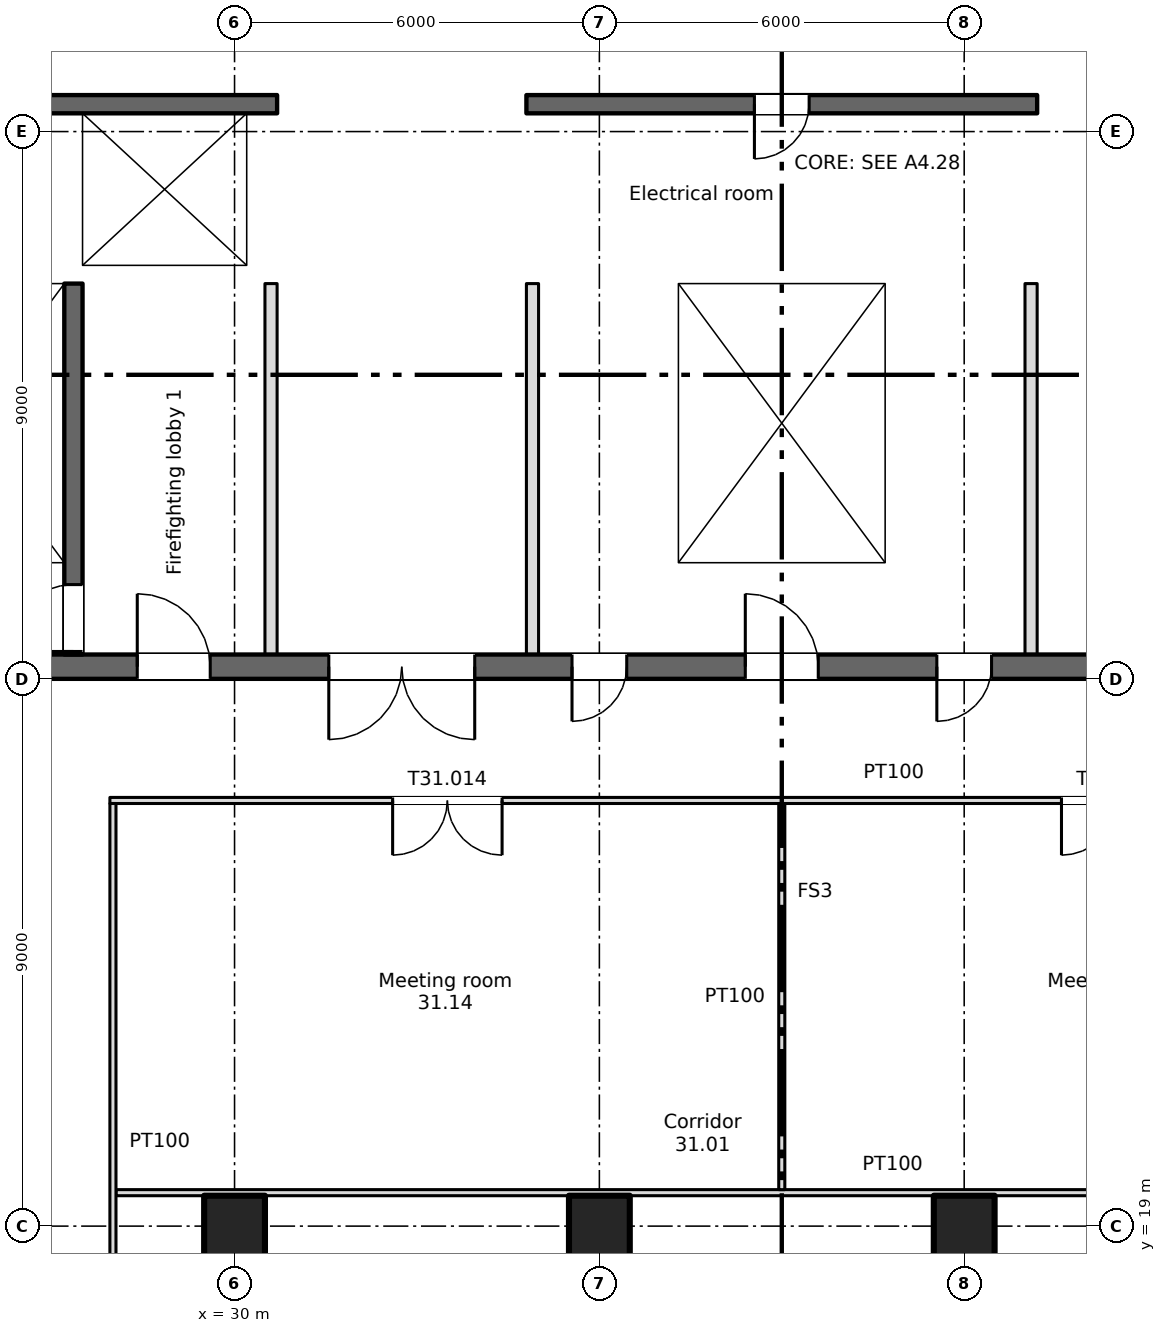
"""IFC4 building model, lengths in metres.
Left out: names, types, materials, properties, quantities, classifications, styles, units other than length and angle.
Written with IfcOpenShell. Run it as: python <this file> out.ifc"""

import sys

from ifc_helpers import new_model, si_unit, direction, frame, frame_2d, origin, origin_2d, place, context, subcontext, project, spatial, rectangle, extrude, element, fill, save


model = new_model("IFC4")
c1 = context("Model", 3, precision=1e-05, world=origin(), true_north=direction((0.0, 1.0)))
c2 = subcontext(c1, "Body", "Model", "MODEL_VIEW")
j1 = project(units=[si_unit("LENGTHUNIT", "METRE"), si_unit("PLANEANGLEUNIT", "RADIAN")], contexts=[c1])
p1 = place(None, origin())
s1 = spatial("IfcSite", under=j1, at=p1, CompositionType="ELEMENT")
p2 = place(p1, origin())
s2 = spatial("IfcBuilding", under=s1, at=p2, CompositionType="ELEMENT")
p3 = place(p2, frame((0.0, 0.0, 215.5)))
s3 = spatial("IfcBuildingStorey", under=s2, at=p3, CompositionType="ELEMENT", Elevation=215.5)
for number, where, z_axis, x_axis in (
    (1, (30.0, 19.0, 0.0), (0.0, 0.0, 1.0), (1.0, 0.0, 0.0)),
    (2, (36.0, 19.0, 0.0), (0.0, 0.0, 1.0), (1.0, 0.0, 0.0)),
    (3, (42.0, 19.0, 0.0), (0.0, 0.0, 1.0), (1.0, 0.0, 0.0)),
):
    element("IfcColumn", number, at=place(p3, frame(where, z_axis=z_axis, x_axis=x_axis)), inside=s3, PredefinedType="COLUMN", context=c2, shape_type="SweptSolid", body=[
        extrude(rectangle(XDim=1.0, YDim=1.0, at=origin_2d()), origin(), (0.0, 0.0, 1.0), 3.35),
    ])
p4 = place(p3, frame((6.6, 28.2, 0.0), z_axis=(0.0, 0.0, 1.0), x_axis=(1.0, 0.0, 0.0)))
e4 = element("IfcWall", 4, at=p4, inside=s3, PredefinedType="SHEAR", context=c2, shape_type="SweptSolid", body=[
    extrude(rectangle(XDim=57.9, YDim=0.4, at=frame_2d((28.95, 0.0))), origin(), (0.0, 0.0, 1.0), 3.35),
])
p5 = place(p4, frame((12.163, 0.0, 0.0)))
e5 = element("IfcOpeningElement", 5, at=p5, cuts=e4, PredefinedType="OPENING", context=c2, shape_type="SweptSolid", body=[
    extrude(rectangle(XDim=0.9, YDim=2.1, at=frame_2d((0.45, 1.05))), frame((0.0, 0.21, 0.0), z_axis=(0.0, -1.0, 0.0), x_axis=(1.0, 0.0, 0.0)), (0.0, 0.0, 1.0), 0.42),
])
p6 = place(p4, frame((14.738, 0.0, 0.0)))
e6 = element("IfcOpeningElement", 6, at=p6, cuts=e4, PredefinedType="OPENING", context=c2, shape_type="SweptSolid", body=[
    extrude(rectangle(XDim=0.9, YDim=2.1, at=frame_2d((0.45, 1.05))), frame((0.0, 0.21, 0.0), z_axis=(0.0, -1.0, 0.0), x_axis=(1.0, 0.0, 0.0)), (0.0, 0.0, 1.0), 0.42),
])
p7 = place(p4, frame((49.163, 0.0, 0.0)))
e7 = element("IfcOpeningElement", 7, at=p7, cuts=e4, PredefinedType="OPENING", context=c2, shape_type="SweptSolid", body=[
    extrude(rectangle(XDim=0.9, YDim=2.1, at=frame_2d((0.45, 1.05))), frame((0.0, 0.21, 0.0), z_axis=(0.0, -1.0, 0.0), x_axis=(1.0, 0.0, 0.0)), (0.0, 0.0, 1.0), 0.42),
])
p8 = place(p4, frame((51.738, 0.0, 0.0)))
e8 = element("IfcOpeningElement", 8, at=p8, cuts=e4, PredefinedType="OPENING", context=c2, shape_type="SweptSolid", body=[
    extrude(rectangle(XDim=0.9, YDim=2.1, at=frame_2d((0.45, 1.05))), frame((0.0, 0.21, 0.0), z_axis=(0.0, -1.0, 0.0), x_axis=(1.0, 0.0, 0.0)), (0.0, 0.0, 1.0), 0.42),
])
p9 = place(p4, frame((1.45, 0.0, 0.0)))
e9 = element("IfcOpeningElement", 9, at=p9, cuts=e4, PredefinedType="OPENING", context=c2, shape_type="SweptSolid", body=[
    extrude(rectangle(XDim=0.9, YDim=2.1, at=frame_2d((0.45, 1.05))), frame((0.0, 0.21, 0.0), z_axis=(0.0, -1.0, 0.0), x_axis=(1.0, 0.0, 0.0)), (0.0, 0.0, 1.0), 0.42),
])
p10 = place(p4, frame((4.8, 0.0, 0.0)))
e10 = element("IfcOpeningElement", 10, at=p10, cuts=e4, PredefinedType="OPENING", context=c2, shape_type="SweptSolid", body=[
    extrude(rectangle(XDim=1.2, YDim=2.1, at=frame_2d((0.6, 1.05))), frame((0.0, 0.21, 0.0), z_axis=(0.0, -1.0, 0.0), x_axis=(1.0, 0.0, 0.0)), (0.0, 0.0, 1.0), 0.42),
])
p11 = place(p4, frame((31.8, 0.0, 0.0)))
e11 = element("IfcOpeningElement", 11, at=p11, cuts=e4, PredefinedType="OPENING", context=c2, shape_type="SweptSolid", body=[
    extrude(rectangle(XDim=1.2, YDim=2.1, at=frame_2d((0.6, 1.05))), frame((0.0, 0.21, 0.0), z_axis=(0.0, -1.0, 0.0), x_axis=(1.0, 0.0, 0.0)), (0.0, 0.0, 1.0), 0.42),
])
p12 = place(p4, frame((55.3, 0.0, 0.0)))
e12 = element("IfcOpeningElement", 12, at=p12, cuts=e4, PredefinedType="OPENING", context=c2, shape_type="SweptSolid", body=[
    extrude(rectangle(XDim=1.2, YDim=2.1, at=frame_2d((0.6, 1.05))), frame((0.0, 0.21, 0.0), z_axis=(0.0, -1.0, 0.0), x_axis=(1.0, 0.0, 0.0)), (0.0, 0.0, 1.0), 0.42),
])
p13 = place(p4, frame((21.8, 0.0, 0.0)))
e13 = element("IfcOpeningElement", 13, at=p13, cuts=e4, PredefinedType="OPENING", context=c2, shape_type="SweptSolid", body=[
    extrude(rectangle(XDim=1.2, YDim=2.1, at=frame_2d((0.6, 1.05))), frame((0.0, 0.21, 0.0), z_axis=(0.0, -1.0, 0.0), x_axis=(1.0, 0.0, 0.0)), (0.0, 0.0, 1.0), 0.42),
])
p14 = place(p4, frame((41.8, 0.0, 0.0)))
e14 = element("IfcOpeningElement", 14, at=p14, cuts=e4, PredefinedType="OPENING", context=c2, shape_type="SweptSolid", body=[
    extrude(rectangle(XDim=1.2, YDim=2.1, at=frame_2d((0.6, 1.05))), frame((0.0, 0.21, 0.0), z_axis=(0.0, -1.0, 0.0), x_axis=(1.0, 0.0, 0.0)), (0.0, 0.0, 1.0), 0.42),
])
p15 = place(p4, frame((24.95, 0.0, 0.0)))
e15 = element("IfcOpeningElement", 15, at=p15, cuts=e4, PredefinedType="OPENING", context=c2, shape_type="SweptSolid", body=[
    extrude(rectangle(XDim=2.4, YDim=2.1, at=frame_2d((1.2, 1.05))), frame((0.0, 0.21, 0.0), z_axis=(0.0, -1.0, 0.0), x_axis=(1.0, 0.0, 0.0)), (0.0, 0.0, 1.0), 0.42),
])
p16 = place(p4, frame((37.45, 0.0, 0.0)))
e16 = element("IfcOpeningElement", 16, at=p16, cuts=e4, PredefinedType="OPENING", context=c2, shape_type="SweptSolid", body=[
    extrude(rectangle(XDim=2.4, YDim=2.1, at=frame_2d((1.2, 1.05))), frame((0.0, 0.21, 0.0), z_axis=(0.0, -1.0, 0.0), x_axis=(1.0, 0.0, 0.0)), (0.0, 0.0, 1.0), 0.42),
])
p17 = place(p4, frame((8.1, 0.0, 0.0)))
e17 = element("IfcOpeningElement", 17, at=p17, cuts=e4, PredefinedType="OPENING", context=c2, shape_type="SweptSolid", body=[
    extrude(rectangle(XDim=2.4, YDim=2.1, at=frame_2d((1.2, 1.05))), frame((0.0, 0.21, 0.0), z_axis=(0.0, -1.0, 0.0), x_axis=(1.0, 0.0, 0.0)), (0.0, 0.0, 1.0), 0.42),
])
p18 = place(p4, frame((28.95, 0.0, 0.0)))
e18 = element("IfcOpeningElement", 18, at=p18, cuts=e4, PredefinedType="OPENING", context=c2, shape_type="SweptSolid", body=[
    extrude(rectangle(XDim=0.9, YDim=2.1, at=frame_2d((0.45, 1.05))), frame((0.0, 0.21, 0.0), z_axis=(0.0, -1.0, 0.0), x_axis=(1.0, 0.0, 0.0)), (0.0, 0.0, 1.0), 0.42),
])
p19 = place(p4, frame((34.95, 0.0, 0.0)))
e19 = element("IfcOpeningElement", 19, at=p19, cuts=e4, PredefinedType="OPENING", context=c2, shape_type="SweptSolid", body=[
    extrude(rectangle(XDim=0.9, YDim=2.1, at=frame_2d((0.45, 1.05))), frame((0.0, 0.21, 0.0), z_axis=(0.0, -1.0, 0.0), x_axis=(1.0, 0.0, 0.0)), (0.0, 0.0, 1.0), 0.42),
])
p20 = place(p3, frame((27.35, 28.4, 0.0), z_axis=(0.0, 0.0, 1.0), x_axis=(0.0, 1.0, 0.0)))
e20 = element("IfcWall", 20, at=p20, inside=s3, PredefinedType="SHEAR", context=c2, shape_type="SweptSolid", body=[
    extrude(rectangle(XDim=6.1, YDim=0.3, at=frame_2d((3.05, 0.0))), origin(), (0.0, 0.0, 1.0), 3.35),
])
p21 = place(p20, frame((0.05, 0.0, 0.0)))
e21 = element("IfcOpeningElement", 21, at=p21, cuts=e20, PredefinedType="OPENING", context=c2, shape_type="SweptSolid", body=[
    extrude(rectangle(XDim=1.1, YDim=2.1, at=frame_2d((0.55, 1.05))), frame((0.0, 0.16, 0.0), z_axis=(0.0, -1.0, 0.0), x_axis=(1.0, 0.0, 0.0)), (0.0, 0.0, 1.0), 0.32),
])
for number, where, z_axis, x_axis in (
    (22, (37.15, 28.4, 0.0), (0.0, 0.0, 1.0), (0.0, 1.0, 0.0)),
    (23, (40.85, 28.4, 0.0), (0.0, 0.0, 1.0), (0.0, 1.0, 0.0)),
):
    element("IfcWall", number, at=place(p3, frame(where, z_axis=z_axis, x_axis=x_axis)), inside=s3, PredefinedType="SHEAR", context=c2, shape_type="SweptSolid", body=[
        extrude(rectangle(XDim=6.1, YDim=0.3, at=frame_2d((3.05, 0.0))), origin(), (0.0, 0.0, 1.0), 3.35),
    ])
p22 = place(p3, frame((18.5, 34.65, 0.0), z_axis=(0.0, 0.0, 1.0), x_axis=(1.0, 0.0, 0.0)))
e24 = element("IfcWall", 24, at=p22, inside=s3, PredefinedType="SHEAR", context=c2, shape_type="SweptSolid", body=[
    extrude(rectangle(XDim=12.2, YDim=0.3, at=frame_2d((6.1, 0.0))), origin(), (0.0, 0.0, 1.0), 3.35),
])
p23 = place(p22, frame((9.8, 0.0, 0.0)))
e25 = element("IfcOpeningElement", 25, at=p23, cuts=e24, PredefinedType="OPENING", context=c2, shape_type="SweptSolid", body=[
    extrude(rectangle(XDim=1.1, YDim=2.1, at=frame_2d((0.55, 1.05))), frame((0.0, 0.16, 0.0), z_axis=(0.0, -1.0, 0.0), x_axis=(1.0, 0.0, 0.0)), (0.0, 0.0, 1.0), 0.32),
])
p24 = place(p3, frame((34.8, 34.65, 0.0), z_axis=(0.0, 0.0, 1.0), x_axis=(1.0, 0.0, 0.0)))
e26 = element("IfcWall", 26, at=p24, inside=s3, PredefinedType="SHEAR", context=c2, shape_type="SweptSolid", body=[
    extrude(rectangle(XDim=8.4, YDim=0.3, at=frame_2d((4.2, 0.0))), origin(), (0.0, 0.0, 1.0), 3.35),
])
p25 = place(p3, frame((30.7, 37.45, 0.0), z_axis=(0.0, 0.0, 1.0), x_axis=(-1.0, 0.0, 0.0)))
e27 = element("IfcWall", 27, at=p25, inside=s3, PredefinedType="SHEAR", context=c2, shape_type="SweptSolid", body=[
    extrude(rectangle(XDim=12.2, YDim=0.3, at=frame_2d((6.1, 0.0))), origin(), (0.0, 0.0, 1.0), 3.35),
])
p26 = place(p25, frame((7.4, 0.0, 0.0)))
e28 = element("IfcOpeningElement", 28, at=p26, cuts=e27, PredefinedType="OPENING", context=c2, shape_type="SweptSolid", body=[
    extrude(rectangle(XDim=0.9, YDim=2.1, at=frame_2d((0.45, 1.05))), frame((0.0, 0.16, 0.0), z_axis=(0.0, -1.0, 0.0), x_axis=(1.0, 0.0, 0.0)), (0.0, 0.0, 1.0), 0.32),
])
p27 = place(p3, frame((43.2, 37.45, 0.0), z_axis=(0.0, 0.0, 1.0), x_axis=(-1.0, 0.0, 0.0)))
e29 = element("IfcWall", 29, at=p27, inside=s3, PredefinedType="SHEAR", context=c2, shape_type="SweptSolid", body=[
    extrude(rectangle(XDim=8.4, YDim=0.3, at=frame_2d((4.2, 0.0))), origin(), (0.0, 0.0, 1.0), 3.35),
])
p28 = place(p27, frame((3.75, 0.0, 0.0)))
e30 = element("IfcOpeningElement", 30, at=p28, cuts=e29, PredefinedType="OPENING", context=c2, shape_type="SweptSolid", body=[
    extrude(rectangle(XDim=0.9, YDim=2.1, at=frame_2d((0.45, 1.05))), frame((0.0, 0.16, 0.0), z_axis=(0.0, -1.0, 0.0), x_axis=(1.0, 0.0, 0.0)), (0.0, 0.0, 1.0), 0.32),
])
p29 = place(p3, frame((27.35, 34.8, 0.0), z_axis=(0.0, 0.0, 1.0), x_axis=(0.0, 1.0, 0.0)))
e31 = element("IfcWall", 31, at=p29, inside=s3, PredefinedType="SHEAR", context=c2, shape_type="SweptSolid", body=[
    extrude(rectangle(XDim=2.5, YDim=0.3, at=frame_2d((1.25, 0.0))), origin(), (0.0, 0.0, 1.0), 3.35),
])
p30 = place(p3, frame((30.45, 34.8, 0.0), z_axis=(0.0, 0.0, 1.0), x_axis=(0.0, 1.0, 0.0)))
e32 = element("IfcWall", 32, at=p30, inside=s3, PredefinedType="SHEAR", context=c2, shape_type="SweptSolid", body=[
    extrude(rectangle(XDim=2.5, YDim=0.5, at=frame_2d((1.25, 0.0))), origin(), (0.0, 0.0, 1.0), 3.35),
])
for number, where, z_axis, x_axis in (
    (33, (34.95, 34.8, 0.0), (0.0, 0.0, 1.0), (0.0, 1.0, 0.0)),
    (34, (43.05, 34.8, 0.0), (0.0, 0.0, 1.0), (0.0, 1.0, 0.0)),
):
    element("IfcWall", number, at=place(p3, frame(where, z_axis=z_axis, x_axis=x_axis)), inside=s3, PredefinedType="SHEAR", context=c2, shape_type="SweptSolid", body=[
        extrude(rectangle(XDim=2.5, YDim=0.3, at=frame_2d((1.25, 0.0))), origin(), (0.0, 0.0, 1.0), 3.35),
    ])
for number, where, z_axis, x_axis in (
    (35, (30.6, 28.4, 0.0), (0.0, 0.0, 1.0), (0.0, 1.0, 0.0)),
    (36, (34.9, 28.4, 0.0), (0.0, 0.0, 1.0), (0.0, 1.0, 0.0)),
    (37, (43.1, 28.4, 0.0), (0.0, 0.0, 1.0), (0.0, 1.0, 0.0)),
):
    element("IfcWall", number, at=place(p3, frame(where, z_axis=z_axis, x_axis=x_axis)), inside=s3, PredefinedType="PARTITIONING", context=c2, shape_type="SweptSolid", body=[
        extrude(rectangle(XDim=6.1, YDim=0.2, at=frame_2d((3.05, 0.0))), origin(), (0.0, 0.0, 1.0), 3.35),
    ])
p31 = place(p3, frame((28.05, 19.55, 0.0), z_axis=(0.0, 0.0, 1.0), x_axis=(1.0, 0.0, 0.0)))
e38 = element("IfcWall", 38, at=p31, inside=s3, PredefinedType="PARTITIONING", context=c2, shape_type="SweptSolid", body=[
    extrude(rectangle(XDim=21.9, YDim=0.1, at=frame_2d((10.95, 0.0))), origin(), (0.0, 0.0, 1.0), 3.35),
])
p32 = place(p3, frame((27.95, 26.0, 0.0), z_axis=(0.0, 0.0, 1.0), x_axis=(1.0, 0.0, 0.0)))
e39 = element("IfcWall", 39, at=p32, inside=s3, PredefinedType="PARTITIONING", context=c2, shape_type="SweptSolid", body=[
    extrude(rectangle(XDim=22.1, YDim=0.1, at=frame_2d((11.05, 0.0))), origin(), (0.0, 0.0, 1.0), 3.35),
])
p33 = place(p32, frame((4.65, 0.0, 0.0)))
e40 = element("IfcOpeningElement", 40, at=p33, cuts=e39, PredefinedType="OPENING", context=c2, shape_type="SweptSolid", body=[
    extrude(rectangle(XDim=1.8, YDim=2.1, at=frame_2d((0.9, 1.05))), frame((0.0, 0.06, 0.0), z_axis=(0.0, -1.0, 0.0), x_axis=(1.0, 0.0, 0.0)), (0.0, 0.0, 1.0), 0.12),
])
p34 = place(p32, frame((15.65, 0.0, 0.0)))
e41 = element("IfcOpeningElement", 41, at=p34, cuts=e39, PredefinedType="OPENING", context=c2, shape_type="SweptSolid", body=[
    extrude(rectangle(XDim=1.8, YDim=2.1, at=frame_2d((0.9, 1.05))), frame((0.0, 0.06, 0.0), z_axis=(0.0, -1.0, 0.0), x_axis=(1.0, 0.0, 0.0)), (0.0, 0.0, 1.0), 0.12),
])
p35 = place(p3, frame((28.0, 12.6, 0.0), z_axis=(0.0, 0.0, 1.0), x_axis=(0.0, 1.0, 0.0)))
e42 = element("IfcWall", 42, at=p35, inside=s3, PredefinedType="PARTITIONING", context=c2, shape_type="SweptSolid", body=[
    extrude(rectangle(XDim=13.35, YDim=0.1, at=frame_2d((6.675, 0.0))), origin(), (0.0, 0.0, 1.0), 3.35),
])
p36 = place(p3, frame((39.0, 19.6, 0.0), z_axis=(0.0, 0.0, 1.0), x_axis=(0.0, 1.0, 0.0)))
e43 = element("IfcWall", 43, at=p36, inside=s3, PredefinedType="PARTITIONING", context=c2, shape_type="SweptSolid", body=[
    extrude(rectangle(XDim=6.35, YDim=0.1, at=frame_2d((3.175, 0.0))), origin(), (0.0, 0.0, 1.0), 3.35),
])
p37 = place(p28, origin())
e44 = element("IfcDoor", 44, at=p37, inside=s3, OperationType="SINGLE_SWING_RIGHT", PredefinedType="DOOR", context=c2, shape_type="SweptSolid", body=[
    extrude(rectangle(XDim=0.9, YDim=2.1, at=frame_2d((0.45, 1.05))), frame((0.0, 0.025, 0.0), z_axis=(0.0, -1.0, 0.0), x_axis=(1.0, 0.0, 0.0)), (0.0, 0.0, 1.0), 0.05),
])
fill(e30, e44)
p38 = place(p23, origin())
e45 = element("IfcDoor", 45, at=p38, inside=s3, OperationType="SLIDING_TO_LEFT", PredefinedType="DOOR", context=c2, shape_type="SweptSolid", body=[
    extrude(rectangle(XDim=1.1, YDim=2.1, at=frame_2d((0.55, 1.05))), frame((0.0, 0.025, 0.0), z_axis=(0.0, -1.0, 0.0), x_axis=(1.0, 0.0, 0.0)), (0.0, 0.0, 1.0), 0.05),
])
fill(e25, e45)
p39 = place(p21, origin())
e46 = element("IfcDoor", 46, at=p39, inside=s3, OperationType="SINGLE_SWING_LEFT", PredefinedType="DOOR", context=c2, shape_type="SweptSolid", body=[
    extrude(rectangle(XDim=1.1, YDim=2.1, at=frame_2d((0.55, 1.05))), frame((0.0, 0.025, 0.0), z_axis=(0.0, -1.0, 0.0), x_axis=(1.0, 0.0, 0.0)), (0.0, 0.0, 1.0), 0.05),
])
fill(e21, e46)
p40 = place(p11, origin())
e47 = element("IfcDoor", 47, at=p40, inside=s3, OperationType="SINGLE_SWING_LEFT", PredefinedType="DOOR", context=c2, shape_type="SweptSolid", body=[
    extrude(rectangle(XDim=1.2, YDim=2.1, at=frame_2d((0.6, 1.05))), frame((0.0, 0.025, 0.0), z_axis=(0.0, -1.0, 0.0), x_axis=(1.0, 0.0, 0.0)), (0.0, 0.0, 1.0), 0.05),
])
fill(e11, e47)
p41 = place(p13, origin())
e48 = element("IfcDoor", 48, at=p41, inside=s3, OperationType="SINGLE_SWING_LEFT", PredefinedType="DOOR", context=c2, shape_type="SweptSolid", body=[
    extrude(rectangle(XDim=1.2, YDim=2.1, at=frame_2d((0.6, 1.05))), frame((0.0, 0.025, 0.0), z_axis=(0.0, -1.0, 0.0), x_axis=(1.0, 0.0, 0.0)), (0.0, 0.0, 1.0), 0.05),
])
fill(e13, e48)
p42 = place(p15, origin())
e49 = element("IfcDoor", 49, at=p42, inside=s3, OperationType="DOUBLE_DOOR_SINGLE_SWING", PredefinedType="DOOR", context=c2, shape_type="SweptSolid", body=[
    extrude(rectangle(XDim=2.4, YDim=2.1, at=frame_2d((1.2, 1.05))), frame((0.0, 0.025, 0.0), z_axis=(0.0, -1.0, 0.0), x_axis=(1.0, 0.0, 0.0)), (0.0, 0.0, 1.0), 0.05),
])
fill(e15, e49)
p43 = place(p18, origin())
e50 = element("IfcDoor", 50, at=p43, inside=s3, OperationType="SINGLE_SWING_LEFT", PredefinedType="DOOR", context=c2, shape_type="SweptSolid", body=[
    extrude(rectangle(XDim=0.9, YDim=2.1, at=frame_2d((0.45, 1.05))), frame((0.0, 0.025, 0.0), z_axis=(0.0, -1.0, 0.0), x_axis=(1.0, 0.0, 0.0)), (0.0, 0.0, 1.0), 0.05),
])
fill(e18, e50)
p44 = place(p19, origin())
e51 = element("IfcDoor", 51, at=p44, inside=s3, OperationType="SINGLE_SWING_LEFT", PredefinedType="DOOR", context=c2, shape_type="SweptSolid", body=[
    extrude(rectangle(XDim=0.9, YDim=2.1, at=frame_2d((0.45, 1.05))), frame((0.0, 0.025, 0.0), z_axis=(0.0, -1.0, 0.0), x_axis=(1.0, 0.0, 0.0)), (0.0, 0.0, 1.0), 0.05),
])
fill(e19, e51)
p45 = place(p33, origin())
e52 = element("IfcDoor", 52, at=p45, inside=s3, OperationType="DOUBLE_DOOR_SINGLE_SWING", PredefinedType="DOOR", context=c2, shape_type="SweptSolid", body=[
    extrude(rectangle(XDim=1.8, YDim=2.1, at=frame_2d((0.9, 1.05))), frame((0.0, 0.025, 0.0), z_axis=(0.0, -1.0, 0.0), x_axis=(1.0, 0.0, 0.0)), (0.0, 0.0, 1.0), 0.05),
])
fill(e40, e52)
p46 = place(p34, origin())
e53 = element("IfcDoor", 53, at=p46, inside=s3, OperationType="DOUBLE_DOOR_SINGLE_SWING", PredefinedType="DOOR", context=c2, shape_type="SweptSolid", body=[
    extrude(rectangle(XDim=1.8, YDim=2.1, at=frame_2d((0.9, 1.05))), frame((0.0, 0.025, 0.0), z_axis=(0.0, -1.0, 0.0), x_axis=(1.0, 0.0, 0.0)), (0.0, 0.0, 1.0), 0.05),
])
fill(e41, e53)
save(model, sys.argv[1])
